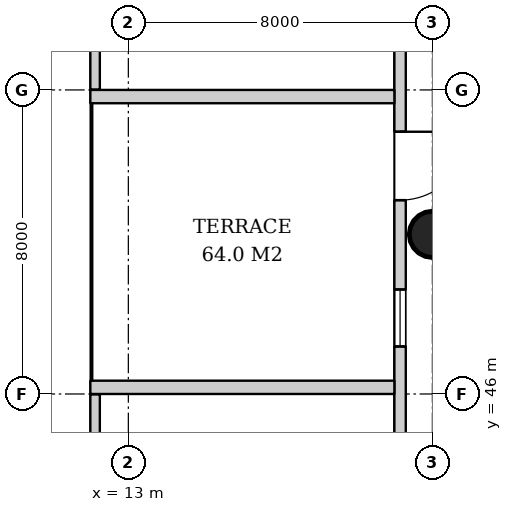
"""IFC4 building model, lengths in metres.
Left out: names, types, materials, properties, quantities, classifications, styles, units other than length and angle.
Written with IfcOpenShell. Run it as: python <this file> out.ifc"""

import sys

from ifc_helpers import new_model, si_unit, direction, frame, frame_2d, origin, origin_2d, place, context, subcontext, project, spatial, rectangle, hollow_circle, extrude, element, fill, save


model = new_model("IFC4")
c1 = context("Model", 3, precision=1e-05, world=origin(), true_north=direction((0.0, 1.0)))
c2 = subcontext(c1, "Body", "Model", "MODEL_VIEW")
j1 = project(units=[si_unit("LENGTHUNIT", "METRE"), si_unit("PLANEANGLEUNIT", "RADIAN")], contexts=[c1])
p1 = place(None, origin())
s1 = spatial("IfcSite", under=j1, at=p1, CompositionType="ELEMENT")
p2 = place(p1, origin())
s2 = spatial("IfcBuilding", under=s1, at=p2, CompositionType="ELEMENT")
p3 = place(p2, frame((0.0, 0.0, 11.0)))
s3 = spatial("IfcBuildingStorey", under=s2, at=p3, CompositionType="ELEMENT", Elevation=11.0)
p4 = place(p3, frame((21.0, 50.2, 0.0), z_axis=(0.0, 0.0, 1.0), x_axis=(1.0, 0.0, 0.0)))
e1 = element("IfcColumn", 1, at=p4, inside=s3, PredefinedType="COLUMN", context=c2, shape_type="SweptSolid", body=[
    extrude(hollow_circle(Radius=0.61, WallThickness=0.04, at=origin_2d()), origin(), (0.0, 0.0, 1.0), 5.0),
])
p5 = place(p3, frame((20.15, 78.7, 0.0), z_axis=(0.0, 0.0, 1.0), x_axis=(0.0, -1.0, 0.0)))
e2 = element("IfcWall", 2, at=p5, inside=s3, PredefinedType="SOLIDWALL", context=c2, shape_type="SweptSolid", body=[
    extrude(rectangle(XDim=57.4, YDim=0.3, at=frame_2d((28.7, 0.0))), origin(), (0.0, 0.0, 1.0), 4.7),
])
p6 = place(p5, frame((1.2, 0.0, 0.9)))
e3 = element("IfcOpeningElement", 3, at=p6, cuts=e2, PredefinedType="OPENING", context=c2, shape_type="SweptSolid", body=[
    extrude(rectangle(XDim=1.5, YDim=3.2, at=frame_2d((0.75, 1.6))), frame((0.0, 0.16, 0.0), z_axis=(0.0, -1.0, 0.0), x_axis=(1.0, 0.0, 0.0)), (0.0, 0.0, 1.0), 0.32),
])
p7 = place(p5, frame((5.7, 0.0, 0.9)))
e4 = element("IfcOpeningElement", 4, at=p7, cuts=e2, PredefinedType="OPENING", context=c2, shape_type="SweptSolid", body=[
    extrude(rectangle(XDim=1.5, YDim=3.2, at=frame_2d((0.75, 1.6))), frame((0.0, 0.16, 0.0), z_axis=(0.0, -1.0, 0.0), x_axis=(1.0, 0.0, 0.0)), (0.0, 0.0, 1.0), 0.32),
])
p8 = place(p5, frame((9.95, 0.0, 0.9)))
e5 = element("IfcOpeningElement", 5, at=p8, cuts=e2, PredefinedType="OPENING", context=c2, shape_type="SweptSolid", body=[
    extrude(rectangle(XDim=1.5, YDim=3.2, at=frame_2d((0.75, 1.6))), frame((0.0, 0.16, 0.0), z_axis=(0.0, -1.0, 0.0), x_axis=(1.0, 0.0, 0.0)), (0.0, 0.0, 1.0), 0.32),
])
p9 = place(p5, frame((13.95, 0.0, 0.9)))
e6 = element("IfcOpeningElement", 6, at=p9, cuts=e2, PredefinedType="OPENING", context=c2, shape_type="SweptSolid", body=[
    extrude(rectangle(XDim=1.5, YDim=3.2, at=frame_2d((0.75, 1.6))), frame((0.0, 0.16, 0.0), z_axis=(0.0, -1.0, 0.0), x_axis=(1.0, 0.0, 0.0)), (0.0, 0.0, 1.0), 0.32),
])
p10 = place(p5, frame((17.95, 0.0, 0.9)))
e7 = element("IfcOpeningElement", 7, at=p10, cuts=e2, PredefinedType="OPENING", context=c2, shape_type="SweptSolid", body=[
    extrude(rectangle(XDim=1.5, YDim=3.2, at=frame_2d((0.75, 1.6))), frame((0.0, 0.16, 0.0), z_axis=(0.0, -1.0, 0.0), x_axis=(1.0, 0.0, 0.0)), (0.0, 0.0, 1.0), 0.32),
])
p11 = place(p5, frame((21.95, 0.0, 0.9)))
e8 = element("IfcOpeningElement", 8, at=p11, cuts=e2, PredefinedType="OPENING", context=c2, shape_type="SweptSolid", body=[
    extrude(rectangle(XDim=1.5, YDim=3.2, at=frame_2d((0.75, 1.6))), frame((0.0, 0.16, 0.0), z_axis=(0.0, -1.0, 0.0), x_axis=(1.0, 0.0, 0.0)), (0.0, 0.0, 1.0), 0.32),
])
p12 = place(p5, frame((25.8, 0.0, 0.0)))
e9 = element("IfcOpeningElement", 9, at=p12, cuts=e2, PredefinedType="OPENING", context=c2, shape_type="SweptSolid", body=[
    extrude(rectangle(XDim=1.8, YDim=2.4, at=frame_2d((0.9, 1.2))), frame((0.0, 0.16, 0.0), z_axis=(0.0, -1.0, 0.0), x_axis=(1.0, 0.0, 0.0)), (0.0, 0.0, 1.0), 0.32),
])
p13 = place(p5, frame((29.95, 0.0, 0.9)))
e10 = element("IfcOpeningElement", 10, at=p13, cuts=e2, PredefinedType="OPENING", context=c2, shape_type="SweptSolid", body=[
    extrude(rectangle(XDim=1.5, YDim=3.2, at=frame_2d((0.75, 1.6))), frame((0.0, 0.16, 0.0), z_axis=(0.0, -1.0, 0.0), x_axis=(1.0, 0.0, 0.0)), (0.0, 0.0, 1.0), 0.32),
])
p14 = place(p5, frame((33.95, 0.0, 0.9)))
e11 = element("IfcOpeningElement", 11, at=p14, cuts=e2, PredefinedType="OPENING", context=c2, shape_type="SweptSolid", body=[
    extrude(rectangle(XDim=1.5, YDim=3.2, at=frame_2d((0.75, 1.6))), frame((0.0, 0.16, 0.0), z_axis=(0.0, -1.0, 0.0), x_axis=(1.0, 0.0, 0.0)), (0.0, 0.0, 1.0), 0.32),
])
p15 = place(p5, frame((37.95, 0.0, 0.9)))
e12 = element("IfcOpeningElement", 12, at=p15, cuts=e2, PredefinedType="OPENING", context=c2, shape_type="SweptSolid", body=[
    extrude(rectangle(XDim=1.5, YDim=3.2, at=frame_2d((0.75, 1.6))), frame((0.0, 0.16, 0.0), z_axis=(0.0, -1.0, 0.0), x_axis=(1.0, 0.0, 0.0)), (0.0, 0.0, 1.0), 0.32),
])
p16 = place(p5, frame((41.95, 0.0, 0.9)))
e13 = element("IfcOpeningElement", 13, at=p16, cuts=e2, PredefinedType="OPENING", context=c2, shape_type="SweptSolid", body=[
    extrude(rectangle(XDim=1.5, YDim=3.2, at=frame_2d((0.75, 1.6))), frame((0.0, 0.16, 0.0), z_axis=(0.0, -1.0, 0.0), x_axis=(1.0, 0.0, 0.0)), (0.0, 0.0, 1.0), 0.32),
])
p17 = place(p5, frame((45.95, 0.0, 0.9)))
e14 = element("IfcOpeningElement", 14, at=p17, cuts=e2, PredefinedType="OPENING", context=c2, shape_type="SweptSolid", body=[
    extrude(rectangle(XDim=1.5, YDim=3.2, at=frame_2d((0.75, 1.6))), frame((0.0, 0.16, 0.0), z_axis=(0.0, -1.0, 0.0), x_axis=(1.0, 0.0, 0.0)), (0.0, 0.0, 1.0), 0.32),
])
p18 = place(p5, frame((50.2, 0.0, 0.9)))
e15 = element("IfcOpeningElement", 15, at=p18, cuts=e2, PredefinedType="OPENING", context=c2, shape_type="SweptSolid", body=[
    extrude(rectangle(XDim=1.5, YDim=3.2, at=frame_2d((0.75, 1.6))), frame((0.0, 0.16, 0.0), z_axis=(0.0, -1.0, 0.0), x_axis=(1.0, 0.0, 0.0)), (0.0, 0.0, 1.0), 0.32),
])
p19 = place(p5, frame((54.7, 0.0, 0.9)))
e16 = element("IfcOpeningElement", 16, at=p19, cuts=e2, PredefinedType="OPENING", context=c2, shape_type="SweptSolid", body=[
    extrude(rectangle(XDim=1.5, YDim=3.2, at=frame_2d((0.75, 1.6))), frame((0.0, 0.16, 0.0), z_axis=(0.0, -1.0, 0.0), x_axis=(1.0, 0.0, 0.0)), (0.0, 0.0, 1.0), 0.32),
])
for number, where, z_axis, x_axis in (
    (17, (12.125, 54.01, 0.0), (0.0, 0.0, 1.0), (0.0, 1.0, 0.0)),
    (18, (12.125, 13.25, 0.0), (0.0, 0.0, 1.0), (0.0, 1.0, 0.0)),
):
    element("IfcWall", number, at=place(p3, frame(where, z_axis=z_axis, x_axis=x_axis)), inside=s3, PredefinedType="PARAPET", context=c2, shape_type="SweptSolid", body=[
        extrude(rectangle(XDim=32.74, YDim=0.25, at=frame_2d((16.37, 0.0))), origin(), (0.0, 0.0, 1.0), 1.1),
    ])
for number, where, z_axis, x_axis in (
    (19, (12.0, 46.175, 0.0), (0.0, 0.0, 1.0), (1.0, 0.0, 0.0)),
    (20, (12.0, 53.825, 0.0), (0.0, 0.0, 1.0), (1.0, 0.0, 0.0)),
):
    element("IfcWall", number, at=place(p3, frame(where, z_axis=z_axis, x_axis=x_axis)), inside=s3, PredefinedType="PARAPET", context=c2, shape_type="SweptSolid", body=[
        extrude(rectangle(XDim=8.0, YDim=0.35, at=frame_2d((4.0, 0.0))), origin(), (0.0, 0.0, 1.0), 1.1),
    ])
p20 = place(p12, origin())
e21 = element("IfcDoor", 21, at=p20, inside=s3, OperationType="DOUBLE_DOOR_SINGLE_SWING", PredefinedType="DOOR", context=c2, shape_type="SweptSolid", body=[
    extrude(rectangle(XDim=1.8, YDim=2.4, at=frame_2d((0.9, 1.2))), frame((0.0, 0.025, 0.0), z_axis=(0.0, -1.0, 0.0), x_axis=(1.0, 0.0, 0.0)), (0.0, 0.0, 1.0), 0.05),
])
fill(e9, e21)
p21 = place(p13, origin())
e22 = element("IfcWindow", 22, at=p21, inside=s3, PartitioningType="SINGLE_PANEL", PredefinedType="WINDOW", context=c2, shape_type="SweptSolid", body=[
    extrude(rectangle(XDim=1.5, YDim=3.2, at=frame_2d((0.75, 1.6))), frame((0.0, 0.03, 0.0), z_axis=(0.0, -1.0, 0.0), x_axis=(1.0, 0.0, 0.0)), (0.0, 0.0, 1.0), 0.06),
])
fill(e10, e22)
save(model, sys.argv[1])
